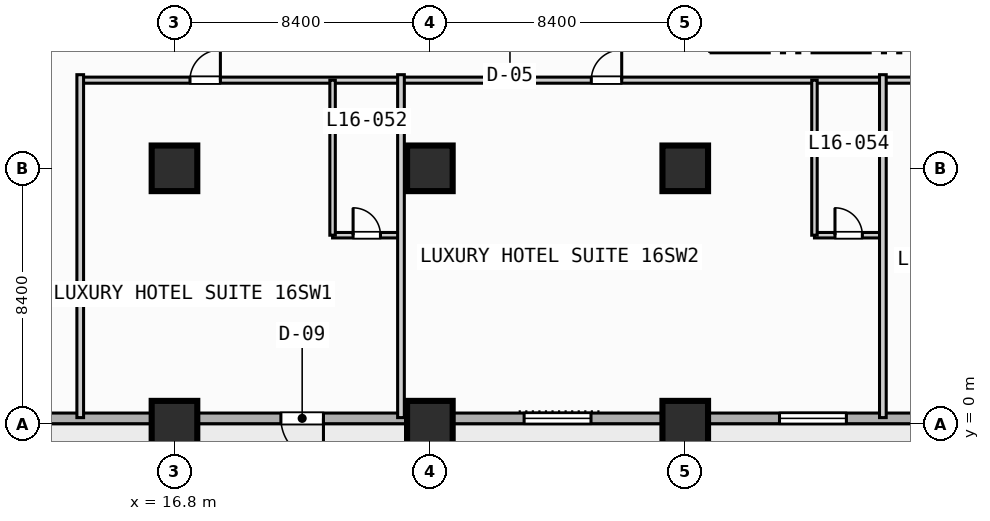
"""IFC4 building model, lengths in metres.
Left out: names, types, materials, properties, quantities, classifications, styles, units other than length and angle.
Written with IfcOpenShell. Run it as: python <this file> out.ifc"""

import sys

from ifc_helpers import new_model, si_unit, direction, frame, frame_2d, origin, origin_2d, place, context, subcontext, project, spatial, rectangle, extrude, element, fill, save


model = new_model("IFC4")
c1 = context("Model", 3, precision=1e-05, world=origin(), true_north=direction((0.0, 1.0)))
c2 = subcontext(c1, "Body", "Model", "MODEL_VIEW")
j1 = project(units=[si_unit("LENGTHUNIT", "METRE"), si_unit("PLANEANGLEUNIT", "RADIAN")], contexts=[c1])
p1 = place(None, origin())
s1 = spatial("IfcSite", under=j1, at=p1, CompositionType="ELEMENT")
p2 = place(p1, origin())
s2 = spatial("IfcBuilding", under=s1, at=p2, CompositionType="ELEMENT")
p3 = place(p2, frame((0.0, 0.0, 70.0)))
s3 = spatial("IfcBuildingStorey", under=s2, at=p3, CompositionType="ELEMENT", Elevation=70.0)
for number, where, z_axis, x_axis in (
    (1, (16.8, 0.0, 0.0), (0.0, 0.0, 1.0), (1.0, 0.0, 0.0)),
    (2, (16.8, 8.4, 0.0), (0.0, 0.0, 1.0), (1.0, 0.0, 0.0)),
    (3, (25.2, 0.0, 0.0), (0.0, 0.0, 1.0), (1.0, 0.0, 0.0)),
    (4, (25.2, 8.4, 0.0), (0.0, 0.0, 1.0), (1.0, 0.0, 0.0)),
    (5, (33.6, 0.0, 0.0), (0.0, 0.0, 1.0), (1.0, 0.0, 0.0)),
    (6, (33.6, 8.4, 0.0), (0.0, 0.0, 1.0), (1.0, 0.0, 0.0)),
):
    element("IfcColumn", number, at=place(p3, frame(where, z_axis=z_axis, x_axis=x_axis)), inside=s3, PredefinedType="COLUMN", context=c2, shape_type="SweptSolid", body=[
        extrude(rectangle(XDim=1.5, YDim=1.5, at=origin_2d()), origin(), (0.0, 0.0, 1.0), 3.8),
    ])
p4 = place(p3, frame((89.225, 0.175, 0.0), z_axis=(0.0, 0.0, 1.0), x_axis=(-1.0, 0.0, 0.0)))
e7 = element("IfcWall", 7, at=p4, inside=s3, PredefinedType="STANDARD", context=c2, shape_type="SweptSolid", body=[
    extrude(rectangle(XDim=86.05, YDim=0.35, at=frame_2d((43.025, 0.0))), origin(), (0.0, 0.0, 1.0), 3.55),
])
p5 = place(p4, frame((67.525, 0.0, 0.0)))
e8 = element("IfcOpeningElement", 8, at=p5, cuts=e7, PredefinedType="OPENING", context=c2, shape_type="SweptSolid", body=[
    extrude(rectangle(XDim=1.4, YDim=2.2, at=frame_2d((0.7, 1.1))), frame((0.0, 0.185, 0.0), z_axis=(0.0, -1.0, 0.0), x_axis=(1.0, 0.0, 0.0)), (0.0, 0.0, 1.0), 0.37),
])
p6 = place(p4, frame((58.725, 0.0, 0.85)))
e9 = element("IfcOpeningElement", 9, at=p6, cuts=e7, PredefinedType="OPENING", context=c2, shape_type="SweptSolid", body=[
    extrude(rectangle(XDim=2.2, YDim=1.8, at=frame_2d((1.1, 0.9))), frame((0.0, 0.185, 0.0), z_axis=(0.0, -1.0, 0.0), x_axis=(1.0, 0.0, 0.0)), (0.0, 0.0, 1.0), 0.37),
])
p7 = place(p4, frame((50.325, 0.0, 0.85)))
e10 = element("IfcOpeningElement", 10, at=p7, cuts=e7, PredefinedType="OPENING", context=c2, shape_type="SweptSolid", body=[
    extrude(rectangle(XDim=2.2, YDim=1.8, at=frame_2d((1.1, 0.9))), frame((0.0, 0.185, 0.0), z_axis=(0.0, -1.0, 0.0), x_axis=(1.0, 0.0, 0.0)), (0.0, 0.0, 1.0), 0.37),
])
p8 = place(p4, frame((41.925, 0.0, 0.85)))
e11 = element("IfcOpeningElement", 11, at=p8, cuts=e7, PredefinedType="OPENING", context=c2, shape_type="SweptSolid", body=[
    extrude(rectangle(XDim=2.2, YDim=1.8, at=frame_2d((1.1, 0.9))), frame((0.0, 0.185, 0.0), z_axis=(0.0, -1.0, 0.0), x_axis=(1.0, 0.0, 0.0)), (0.0, 0.0, 1.0), 0.37),
])
p9 = place(p4, frame((27.675, 0.0, 0.85)))
e12 = element("IfcOpeningElement", 12, at=p9, cuts=e7, PredefinedType="OPENING", context=c2, shape_type="SweptSolid", body=[
    extrude(rectangle(XDim=1.8, YDim=1.8, at=frame_2d((0.9, 0.9))), frame((0.0, 0.185, 0.0), z_axis=(0.0, -1.0, 0.0), x_axis=(1.0, 0.0, 0.0)), (0.0, 0.0, 1.0), 0.37),
])
p10 = place(p3, frame((13.7, 11.3, 0.0), z_axis=(0.0, 0.0, 1.0), x_axis=(1.0, 0.0, 0.0)))
e13 = element("IfcWall", 13, at=p10, inside=s3, PredefinedType="PARTITIONING", context=c2, shape_type="SweptSolid", body=[
    extrude(rectangle(XDim=50.1, YDim=0.2, at=frame_2d((25.05, 0.0))), origin(), (0.0, 0.0, 1.0), 3.55),
])
p11 = place(p10, frame((3.61, 0.0, 0.0)))
e14 = element("IfcOpeningElement", 14, at=p11, cuts=e13, PredefinedType="OPENING", context=c2, shape_type="SweptSolid", body=[
    extrude(rectangle(XDim=1.0, YDim=2.15, at=frame_2d((0.5, 1.075))), frame((0.0, 0.11, 0.0), z_axis=(0.0, -1.0, 0.0), x_axis=(1.0, 0.0, 0.0)), (0.0, 0.0, 1.0), 0.22),
])
p12 = place(p10, frame((16.81, 0.0, 0.0)))
e15 = element("IfcOpeningElement", 15, at=p12, cuts=e13, PredefinedType="OPENING", context=c2, shape_type="SweptSolid", body=[
    extrude(rectangle(XDim=1.0, YDim=2.15, at=frame_2d((0.5, 1.075))), frame((0.0, 0.11, 0.0), z_axis=(0.0, -1.0, 0.0), x_axis=(1.0, 0.0, 0.0)), (0.0, 0.0, 1.0), 0.22),
])
p13 = place(p10, frame((31.935, 0.0, 0.0)))
e16 = element("IfcOpeningElement", 16, at=p13, cuts=e13, PredefinedType="OPENING", context=c2, shape_type="SweptSolid", body=[
    extrude(rectangle(XDim=1.0, YDim=2.15, at=frame_2d((0.5, 1.075))), frame((0.0, 0.11, 0.0), z_axis=(0.0, -1.0, 0.0), x_axis=(1.0, 0.0, 0.0)), (0.0, 0.0, 1.0), 0.22),
])
p14 = place(p10, frame((43.785, 0.0, 0.0)))
e17 = element("IfcOpeningElement", 17, at=p14, cuts=e13, PredefinedType="OPENING", context=c2, shape_type="SweptSolid", body=[
    extrude(rectangle(XDim=1.0, YDim=2.15, at=frame_2d((0.5, 1.075))), frame((0.0, 0.11, 0.0), z_axis=(0.0, -1.0, 0.0), x_axis=(1.0, 0.0, 0.0)), (0.0, 0.0, 1.0), 0.22),
])
p15 = place(p3, frame((13.7, 0.2, 0.0), z_axis=(0.0, 0.0, 1.0), x_axis=(0.0, 1.0, 0.0)))
e18 = element("IfcWall", 18, at=p15, inside=s3, PredefinedType="PARTITIONING", context=c2, shape_type="SweptSolid", body=[
    extrude(rectangle(XDim=11.28, YDim=0.22, at=frame_2d((5.64, 0.0))), origin(), (0.0, 0.0, 1.0), 3.55),
])
p16 = place(p3, frame((22.0, 6.2, 0.0), z_axis=(0.0, 0.0, 1.0), x_axis=(1.0, 0.0, 0.0)))
e19 = element("IfcWall", 19, at=p16, inside=s3, PredefinedType="PLUMBINGWALL", context=c2, shape_type="SweptSolid", body=[
    extrude(rectangle(XDim=2.25, YDim=0.18, at=frame_2d((1.125, 0.0))), origin(), (0.0, 0.0, 1.0), 3.55),
])
p17 = place(p16, frame((0.675, 0.0, 0.0)))
e20 = element("IfcOpeningElement", 20, at=p17, cuts=e19, PredefinedType="OPENING", context=c2, shape_type="SweptSolid", body=[
    extrude(rectangle(XDim=0.9, YDim=2.1, at=frame_2d((0.45, 1.05))), frame((0.0, 0.1, 0.0), z_axis=(0.0, -1.0, 0.0), x_axis=(1.0, 0.0, 0.0)), (0.0, 0.0, 1.0), 0.2),
])
p18 = place(p3, frame((22.0, 6.2, 0.0), z_axis=(0.0, 0.0, 1.0), x_axis=(0.0, 1.0, 0.0)))
e21 = element("IfcWall", 21, at=p18, inside=s3, PredefinedType="PLUMBINGWALL", context=c2, shape_type="SweptSolid", body=[
    extrude(rectangle(XDim=5.1, YDim=0.18, at=frame_2d((2.55, 0.0))), origin(), (0.0, 0.0, 1.0), 3.55),
])
p19 = place(p3, frame((24.25, 0.2, 0.0), z_axis=(0.0, 0.0, 1.0), x_axis=(0.0, 1.0, 0.0)))
e22 = element("IfcWall", 22, at=p19, inside=s3, PredefinedType="PARTITIONING", context=c2, shape_type="SweptSolid", body=[
    extrude(rectangle(XDim=11.28, YDim=0.22, at=frame_2d((5.64, 0.0))), origin(), (0.0, 0.0, 1.0), 3.55),
])
p20 = place(p3, frame((37.85, 6.2, 0.0), z_axis=(0.0, 0.0, 1.0), x_axis=(1.0, 0.0, 0.0)))
e23 = element("IfcWall", 23, at=p20, inside=s3, PredefinedType="PLUMBINGWALL", context=c2, shape_type="SweptSolid", body=[
    extrude(rectangle(XDim=2.25, YDim=0.18, at=frame_2d((1.125, 0.0))), origin(), (0.0, 0.0, 1.0), 3.55),
])
p21 = place(p20, frame((0.675, 0.0, 0.0)))
e24 = element("IfcOpeningElement", 24, at=p21, cuts=e23, PredefinedType="OPENING", context=c2, shape_type="SweptSolid", body=[
    extrude(rectangle(XDim=0.9, YDim=2.1, at=frame_2d((0.45, 1.05))), frame((0.0, 0.1, 0.0), z_axis=(0.0, -1.0, 0.0), x_axis=(1.0, 0.0, 0.0)), (0.0, 0.0, 1.0), 0.2),
])
p22 = place(p3, frame((37.85, 6.2, 0.0), z_axis=(0.0, 0.0, 1.0), x_axis=(0.0, 1.0, 0.0)))
e25 = element("IfcWall", 25, at=p22, inside=s3, PredefinedType="PLUMBINGWALL", context=c2, shape_type="SweptSolid", body=[
    extrude(rectangle(XDim=5.1, YDim=0.18, at=frame_2d((2.55, 0.0))), origin(), (0.0, 0.0, 1.0), 3.55),
])
p23 = place(p3, frame((40.1, 0.2, 0.0), z_axis=(0.0, 0.0, 1.0), x_axis=(0.0, 1.0, 0.0)))
e26 = element("IfcWall", 26, at=p23, inside=s3, PredefinedType="PARTITIONING", context=c2, shape_type="SweptSolid", body=[
    extrude(rectangle(XDim=11.28, YDim=0.22, at=frame_2d((5.64, 0.0))), origin(), (0.0, 0.0, 1.0), 3.55),
])
p24 = place(p5, origin())
e27 = element("IfcDoor", 27, at=p24, inside=s3, OperationType="SINGLE_SWING_LEFT", PredefinedType="DOOR", context=c2, shape_type="SweptSolid", body=[
    extrude(rectangle(XDim=1.4, YDim=2.2, at=frame_2d((0.7, 1.1))), frame((0.0, 0.025, 0.0), z_axis=(0.0, -1.0, 0.0), x_axis=(1.0, 0.0, 0.0)), (0.0, 0.0, 1.0), 0.05),
])
fill(e8, e27)
p25 = place(p6, origin())
e28 = element("IfcWindow", 28, at=p25, inside=s3, PartitioningType="SINGLE_PANEL", PredefinedType="WINDOW", context=c2, shape_type="SweptSolid", body=[
    extrude(rectangle(XDim=2.2, YDim=1.8, at=frame_2d((1.1, 0.9))), frame((0.0, 0.03, 0.0), z_axis=(0.0, -1.0, 0.0), x_axis=(1.0, 0.0, 0.0)), (0.0, 0.0, 1.0), 0.06),
])
fill(e9, e28)
p26 = place(p7, origin())
e29 = element("IfcWindow", 29, at=p26, inside=s3, PartitioningType="SINGLE_PANEL", PredefinedType="WINDOW", context=c2, shape_type="SweptSolid", body=[
    extrude(rectangle(XDim=2.2, YDim=1.8, at=frame_2d((1.1, 0.9))), frame((0.0, 0.03, 0.0), z_axis=(0.0, -1.0, 0.0), x_axis=(1.0, 0.0, 0.0)), (0.0, 0.0, 1.0), 0.06),
])
fill(e10, e29)
p27 = place(p11, origin())
e30 = element("IfcDoor", 30, at=p27, inside=s3, OperationType="SINGLE_SWING_RIGHT", PredefinedType="DOOR", context=c2, shape_type="SweptSolid", body=[
    extrude(rectangle(XDim=1.0, YDim=2.15, at=frame_2d((0.5, 1.075))), frame((0.0, 0.025, 0.0), z_axis=(0.0, -1.0, 0.0), x_axis=(1.0, 0.0, 0.0)), (0.0, 0.0, 1.0), 0.05),
])
fill(e14, e30)
p28 = place(p12, origin())
e31 = element("IfcDoor", 31, at=p28, inside=s3, OperationType="SINGLE_SWING_RIGHT", PredefinedType="DOOR", context=c2, shape_type="SweptSolid", body=[
    extrude(rectangle(XDim=1.0, YDim=2.15, at=frame_2d((0.5, 1.075))), frame((0.0, 0.025, 0.0), z_axis=(0.0, -1.0, 0.0), x_axis=(1.0, 0.0, 0.0)), (0.0, 0.0, 1.0), 0.05),
])
fill(e15, e31)
p29 = place(p17, origin())
e32 = element("IfcDoor", 32, at=p29, inside=s3, OperationType="SINGLE_SWING_LEFT", PredefinedType="DOOR", context=c2, shape_type="SweptSolid", body=[
    extrude(rectangle(XDim=0.9, YDim=2.1, at=frame_2d((0.45, 1.05))), frame((0.0, 0.025, 0.0), z_axis=(0.0, -1.0, 0.0), x_axis=(1.0, 0.0, 0.0)), (0.0, 0.0, 1.0), 0.05),
])
fill(e20, e32)
p30 = place(p21, origin())
e33 = element("IfcDoor", 33, at=p30, inside=s3, OperationType="SINGLE_SWING_LEFT", PredefinedType="DOOR", context=c2, shape_type="SweptSolid", body=[
    extrude(rectangle(XDim=0.9, YDim=2.1, at=frame_2d((0.45, 1.05))), frame((0.0, 0.025, 0.0), z_axis=(0.0, -1.0, 0.0), x_axis=(1.0, 0.0, 0.0)), (0.0, 0.0, 1.0), 0.05),
])
fill(e24, e33)
save(model, sys.argv[1])
